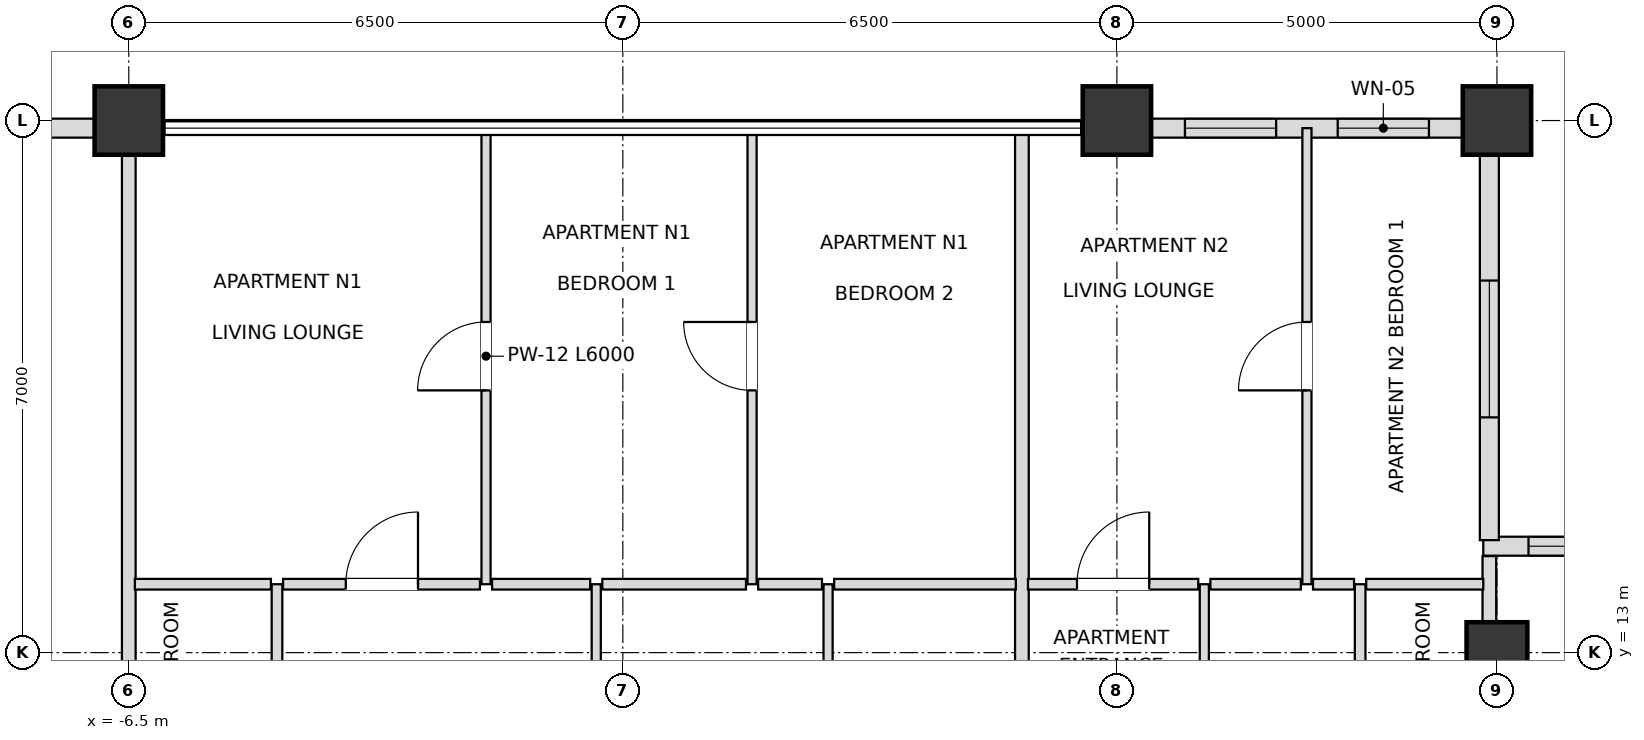
"""IFC4 building model, lengths in metres.
Left out: names, types, materials, properties, quantities, classifications, styles, units other than length and angle.
Written with IfcOpenShell. Run it as: python <this file> out.ifc"""

import sys

from ifc_helpers import new_model, si_unit, direction, frame, frame_2d, origin, origin_2d, place, context, subcontext, project, spatial, rectangle, extrude, element, fill, save


model = new_model("IFC4")
c1 = context("Model", 3, precision=1e-05, world=origin(), true_north=direction((0.0, 1.0)))
c2 = subcontext(c1, "Body", "Model", "MODEL_VIEW")
j1 = project(units=[si_unit("LENGTHUNIT", "METRE"), si_unit("PLANEANGLEUNIT", "RADIAN")], contexts=[c1])
p1 = place(None, origin())
s1 = spatial("IfcSite", under=j1, at=p1, CompositionType="ELEMENT")
p2 = place(p1, origin())
s2 = spatial("IfcBuilding", under=s1, at=p2, CompositionType="ELEMENT")
p3 = place(p2, frame((0.0, 0.0, 243.9)))
s3 = spatial("IfcBuildingStorey", under=s2, at=p3, CompositionType="ELEMENT", Elevation=243.9)
for number, where, z_axis, x_axis in (
    (1, (11.5, 20.0, 0.0), (0.0, 0.0, 1.0), (1.0, 0.0, 0.0)),
    (2, (6.5, 20.0, 0.0), (0.0, 0.0, 1.0), (1.0, 0.0, 0.0)),
    (3, (-6.5, 20.0, 0.0), (0.0, 0.0, 1.0), (1.0, 0.0, 0.0)),
):
    element("IfcColumn", number, at=place(p3, frame(where, z_axis=z_axis, x_axis=x_axis)), inside=s3, PredefinedType="USERDEFINED", context=c2, shape_type="SweptSolid", body=[
        extrude(rectangle(XDim=0.9, YDim=0.9, at=origin_2d()), origin(), (0.0, 0.0, 1.0), 3.6),
    ])
p4 = place(p3, frame((11.5, 13.0, 0.0), z_axis=(0.0, 0.0, 1.0), x_axis=(1.0, 0.0, 0.0)))
e4 = element("IfcColumn", 4, at=p4, inside=s3, PredefinedType="COLUMN", context=c2, shape_type="SweptSolid", body=[
    extrude(rectangle(XDim=0.8, YDim=0.8, at=origin_2d()), origin(), (0.0, 0.0, 1.0), 3.6),
])
p5 = place(p3, frame((11.055, 19.9, 0.0), z_axis=(0.0, 0.0, 1.0), x_axis=(-1.0, 0.0, 0.0)))
e5 = element("IfcWall", 5, at=p5, inside=s3, PredefinedType="SOLIDWALL", context=c2, shape_type="SweptSolid", body=[
    extrude(rectangle(XDim=4.11, YDim=0.25, at=frame_2d((2.055, 0.0))), origin(), (0.0, 0.0, 1.0), 2.748),
])
p6 = place(p5, frame((0.45, 0.0, 0.72)))
e6 = element("IfcOpeningElement", 6, at=p6, cuts=e5, PredefinedType="OPENING", context=c2, shape_type="SweptSolid", body=[
    extrude(rectangle(XDim=1.2, YDim=1.68, at=frame_2d((0.6, 0.84))), frame((0.0, 0.135, 0.0), z_axis=(0.0, -1.0, 0.0), x_axis=(1.0, 0.0, 0.0)), (0.0, 0.0, 1.0), 0.27),
])
p7 = place(p5, frame((2.46, 0.0, 0.72)))
e7 = element("IfcOpeningElement", 7, at=p7, cuts=e5, PredefinedType="OPENING", context=c2, shape_type="SweptSolid", body=[
    extrude(rectangle(XDim=1.2, YDim=1.68, at=frame_2d((0.6, 0.84))), frame((0.0, 0.135, 0.0), z_axis=(0.0, -1.0, 0.0), x_axis=(1.0, 0.0, 0.0)), (0.0, 0.0, 1.0), 0.27),
])
p8 = place(p3, frame((-6.945, 19.9, 0.0), z_axis=(0.0, 0.0, 1.0), x_axis=(-1.0, 0.0, 0.0)))
e8 = element("IfcWall", 8, at=p8, inside=s3, PredefinedType="SOLIDWALL", context=c2, shape_type="SweptSolid", body=[
    extrude(rectangle(XDim=4.11, YDim=0.25, at=frame_2d((2.055, 0.0))), origin(), (0.0, 0.0, 1.0), 2.748),
])
p9 = place(p8, frame((1.155, 0.0, 0.72)))
e9 = element("IfcOpeningElement", 9, at=p9, cuts=e8, PredefinedType="OPENING", context=c2, shape_type="SweptSolid", body=[
    extrude(rectangle(XDim=1.8, YDim=1.68, at=frame_2d((0.9, 0.84))), frame((0.0, 0.135, 0.0), z_axis=(0.0, -1.0, 0.0), x_axis=(1.0, 0.0, 0.0)), (0.0, 0.0, 1.0), 0.27),
])
p10 = place(p3, frame((16.98, 14.4, 0.0), z_axis=(0.0, 0.0, 1.0), x_axis=(-1.0, 0.0, 0.0)))
e10 = element("IfcWall", 10, at=p10, inside=s3, PredefinedType="SOLIDWALL", context=c2, shape_type="SweptSolid", body=[
    extrude(rectangle(XDim=5.66, YDim=0.25, at=frame_2d((2.83, 0.0))), origin(), (0.0, 0.0, 1.0), 2.748),
])
p11 = place(p10, frame((0.595, 0.0, 0.72)))
e11 = element("IfcOpeningElement", 11, at=p11, cuts=e10, PredefinedType="OPENING", context=c2, shape_type="SweptSolid", body=[
    extrude(rectangle(XDim=1.8, YDim=1.68, at=frame_2d((0.9, 0.84))), frame((0.0, 0.135, 0.0), z_axis=(0.0, -1.0, 0.0), x_axis=(1.0, 0.0, 0.0)), (0.0, 0.0, 1.0), 0.27),
])
p12 = place(p10, frame((3.265, 0.0, 0.72)))
e12 = element("IfcOpeningElement", 12, at=p12, cuts=e10, PredefinedType="OPENING", context=c2, shape_type="SweptSolid", body=[
    extrude(rectangle(XDim=1.8, YDim=1.68, at=frame_2d((0.9, 0.84))), frame((0.0, 0.135, 0.0), z_axis=(0.0, -1.0, 0.0), x_axis=(1.0, 0.0, 0.0)), (0.0, 0.0, 1.0), 0.27),
])
p13 = place(p3, frame((11.4, 14.48, 0.0), z_axis=(0.0, 0.0, 1.0), x_axis=(0.0, 1.0, 0.0)))
e13 = element("IfcWall", 13, at=p13, inside=s3, PredefinedType="SOLIDWALL", context=c2, shape_type="SweptSolid", body=[
    extrude(rectangle(XDim=5.34, YDim=0.25, at=frame_2d((2.67, 0.0))), origin(), (0.0, 0.0, 1.0), 2.748),
])
p14 = place(p13, frame((1.615, 0.0, 0.72)))
e14 = element("IfcOpeningElement", 14, at=p14, cuts=e13, PredefinedType="OPENING", context=c2, shape_type="SweptSolid", body=[
    extrude(rectangle(XDim=1.8, YDim=1.68, at=frame_2d((0.9, 0.84))), frame((0.0, 0.135, 0.0), z_axis=(0.0, -1.0, 0.0), x_axis=(1.0, 0.0, 0.0)), (0.0, 0.0, 1.0), 0.27),
])
p15 = place(p3, frame((-6.5, 9.2, 0.0), z_axis=(0.0, 0.0, 1.0), x_axis=(0.0, 1.0, 0.0)))
e15 = element("IfcWall", 15, at=p15, inside=s3, PredefinedType="PARTITIONING", context=c2, shape_type="SweptSolid", body=[
    extrude(rectangle(XDim=10.7, YDim=0.18, at=frame_2d((5.35, 0.0))), origin(), (0.0, 0.0, 1.0), 2.826),
])
p16 = place(p3, frame((-4.55, 9.2, 0.0), z_axis=(0.0, 0.0, 1.0), x_axis=(0.0, 1.0, 0.0)))
e16 = element("IfcWall", 16, at=p16, inside=s3, PredefinedType="PARTITIONING", context=c2, shape_type="SweptSolid", body=[
    extrude(rectangle(XDim=4.7, YDim=0.14, at=frame_2d((2.35, 0.0))), origin(), (0.0, 0.0, 1.0), 3.38),
])
p17 = place(p16, frame((1.9, 0.0, 0.0)))
e17 = element("IfcOpeningElement", 17, at=p17, cuts=e16, PredefinedType="OPENING", context=c2, shape_type="SweptSolid", body=[
    extrude(rectangle(XDim=0.9, YDim=2.1, at=frame_2d((0.45, 1.05))), frame((0.0, 0.08, 0.0), z_axis=(0.0, -1.0, 0.0), x_axis=(1.0, 0.0, 0.0)), (0.0, 0.0, 1.0), 0.16),
])
p18 = place(p3, frame((-1.8, 13.9, 0.0), z_axis=(0.0, 0.0, 1.0), x_axis=(0.0, 1.0, 0.0)))
e18 = element("IfcWall", 18, at=p18, inside=s3, PredefinedType="PARTITIONING", context=c2, shape_type="SweptSolid", body=[
    extrude(rectangle(XDim=6.0, YDim=0.12, at=frame_2d((3.0, 0.0))), origin(), (0.0, 0.0, 1.0), 3.018),
])
p19 = place(p18, frame((2.55, 0.0, 0.0)))
e19 = element("IfcOpeningElement", 19, at=p19, cuts=e18, PredefinedType="OPENING", context=c2, shape_type="SweptSolid", body=[
    extrude(rectangle(XDim=0.9, YDim=2.1, at=frame_2d((0.45, 1.05))), frame((0.0, 0.07, 0.0), z_axis=(0.0, -1.0, 0.0), x_axis=(1.0, 0.0, 0.0)), (0.0, 0.0, 1.0), 0.14),
])
p20 = place(p3, frame((-0.35, 9.2, 0.0), z_axis=(0.0, 0.0, 1.0), x_axis=(0.0, 1.0, 0.0)))
e20 = element("IfcWall", 20, at=p20, inside=s3, PredefinedType="PARTITIONING", context=c2, shape_type="SweptSolid", body=[
    extrude(rectangle(XDim=4.7, YDim=0.12, at=frame_2d((2.35, 0.0))), origin(), (0.0, 0.0, 1.0), 3.38),
])
p21 = place(p20, frame((1.875, 0.0, 0.0)))
e21 = element("IfcOpeningElement", 21, at=p21, cuts=e20, PredefinedType="OPENING", context=c2, shape_type="SweptSolid", body=[
    extrude(rectangle(XDim=0.95, YDim=2.1, at=frame_2d((0.475, 1.05))), frame((0.0, 0.07, 0.0), z_axis=(0.0, -1.0, 0.0), x_axis=(1.0, 0.0, 0.0)), (0.0, 0.0, 1.0), 0.14),
])
p22 = place(p3, frame((1.7, 13.9, 0.0), z_axis=(0.0, 0.0, 1.0), x_axis=(0.0, 1.0, 0.0)))
e22 = element("IfcWall", 22, at=p22, inside=s3, PredefinedType="PARTITIONING", context=c2, shape_type="SweptSolid", body=[
    extrude(rectangle(XDim=6.0, YDim=0.12, at=frame_2d((3.0, 0.0))), origin(), (0.0, 0.0, 1.0), 3.018),
])
p23 = place(p22, frame((2.55, 0.0, 0.0)))
e23 = element("IfcOpeningElement", 23, at=p23, cuts=e22, PredefinedType="OPENING", context=c2, shape_type="SweptSolid", body=[
    extrude(rectangle(XDim=0.9, YDim=2.1, at=frame_2d((0.45, 1.05))), frame((0.0, 0.07, 0.0), z_axis=(0.0, -1.0, 0.0), x_axis=(1.0, 0.0, 0.0)), (0.0, 0.0, 1.0), 0.14),
])
p24 = place(p3, frame((2.7, 9.2, 0.0), z_axis=(0.0, 0.0, 1.0), x_axis=(0.0, 1.0, 0.0)))
e24 = element("IfcWall", 24, at=p24, inside=s3, PredefinedType="PARTITIONING", context=c2, shape_type="SweptSolid", body=[
    extrude(rectangle(XDim=4.7, YDim=0.12, at=frame_2d((2.35, 0.0))), origin(), (0.0, 0.0, 1.0), 3.38),
])
p25 = place(p24, frame((1.9, 0.0, 0.0)))
e25 = element("IfcOpeningElement", 25, at=p25, cuts=e24, PredefinedType="OPENING", context=c2, shape_type="SweptSolid", body=[
    extrude(rectangle(XDim=0.9, YDim=2.1, at=frame_2d((0.45, 1.05))), frame((0.0, 0.07, 0.0), z_axis=(0.0, -1.0, 0.0), x_axis=(1.0, 0.0, 0.0)), (0.0, 0.0, 1.0), 0.14),
])
p26 = place(p3, frame((5.25, 9.2, 0.0), z_axis=(0.0, 0.0, 1.0), x_axis=(0.0, 1.0, 0.0)))
e26 = element("IfcWall", 26, at=p26, inside=s3, PredefinedType="PARTITIONING", context=c2, shape_type="SweptSolid", body=[
    extrude(rectangle(XDim=10.7, YDim=0.18, at=frame_2d((5.35, 0.0))), origin(), (0.0, 0.0, 1.0), 3.018),
])
p27 = place(p3, frame((7.65, 9.2, 0.0), z_axis=(0.0, 0.0, 1.0), x_axis=(0.0, 1.0, 0.0)))
e27 = element("IfcWall", 27, at=p27, inside=s3, PredefinedType="PARTITIONING", context=c2, shape_type="SweptSolid", body=[
    extrude(rectangle(XDim=4.7, YDim=0.12, at=frame_2d((2.35, 0.0))), origin(), (0.0, 0.0, 1.0), 2.826),
])
p28 = place(p27, frame((1.875, 0.0, 0.0)))
e28 = element("IfcOpeningElement", 28, at=p28, cuts=e27, PredefinedType="OPENING", context=c2, shape_type="SweptSolid", body=[
    extrude(rectangle(XDim=0.95, YDim=2.1, at=frame_2d((0.475, 1.05))), frame((0.0, 0.07, 0.0), z_axis=(0.0, -1.0, 0.0), x_axis=(1.0, 0.0, 0.0)), (0.0, 0.0, 1.0), 0.14),
])
p29 = place(p3, frame((9.0, 13.9, 0.0), z_axis=(0.0, 0.0, 1.0), x_axis=(0.0, 1.0, 0.0)))
e29 = element("IfcWall", 29, at=p29, inside=s3, PredefinedType="PARTITIONING", context=c2, shape_type="SweptSolid", body=[
    extrude(rectangle(XDim=6.0, YDim=0.12, at=frame_2d((3.0, 0.0))), origin(), (0.0, 0.0, 1.0), 3.38),
])
p30 = place(p29, frame((2.55, 0.0, 0.0)))
e30 = element("IfcOpeningElement", 30, at=p30, cuts=e29, PredefinedType="OPENING", context=c2, shape_type="SweptSolid", body=[
    extrude(rectangle(XDim=0.9, YDim=2.1, at=frame_2d((0.45, 1.05))), frame((0.0, 0.07, 0.0), z_axis=(0.0, -1.0, 0.0), x_axis=(1.0, 0.0, 0.0)), (0.0, 0.0, 1.0), 0.14),
])
p31 = place(p3, frame((9.7, 9.2, 0.0), z_axis=(0.0, 0.0, 1.0), x_axis=(0.0, 1.0, 0.0)))
e31 = element("IfcWall", 31, at=p31, inside=s3, PredefinedType="PARTITIONING", context=c2, shape_type="SweptSolid", body=[
    extrude(rectangle(XDim=4.7, YDim=0.14, at=frame_2d((2.35, 0.0))), origin(), (0.0, 0.0, 1.0), 2.826),
])
p32 = place(p31, frame((1.9, 0.0, 0.0)))
e32 = element("IfcOpeningElement", 32, at=p32, cuts=e31, PredefinedType="OPENING", context=c2, shape_type="SweptSolid", body=[
    extrude(rectangle(XDim=0.9, YDim=2.1, at=frame_2d((0.45, 1.05))), frame((0.0, 0.08, 0.0), z_axis=(0.0, -1.0, 0.0), x_axis=(1.0, 0.0, 0.0)), (0.0, 0.0, 1.0), 0.16),
])
p33 = place(p3, frame((11.4, 9.2, 0.0), z_axis=(0.0, 0.0, 1.0), x_axis=(0.0, 1.0, 0.0)))
e33 = element("IfcWall", 33, at=p33, inside=s3, PredefinedType="PARTITIONING", context=c2, shape_type="SweptSolid", body=[
    extrude(rectangle(XDim=5.07, YDim=0.18, at=frame_2d((2.535, 0.0))), origin(), (0.0, 0.0, 1.0), 2.748),
])
p34 = place(p3, frame((-6.42, 13.9, 0.0), z_axis=(0.0, 0.0, 1.0), x_axis=(1.0, 0.0, 0.0)))
e34 = element("IfcWall", 34, at=p34, inside=s3, PredefinedType="PARTITIONING", context=c2, shape_type="SweptSolid", body=[
    extrude(rectangle(XDim=1.79, YDim=0.14, at=frame_2d((0.895, 0.0))), origin(), (0.0, 0.0, 1.0), 3.38),
])
p35 = place(p3, frame((-4.47, 13.9, 0.0), z_axis=(0.0, 0.0, 1.0), x_axis=(1.0, 0.0, 0.0)))
e35 = element("IfcWall", 35, at=p35, inside=s3, PredefinedType="PARTITIONING", context=c2, shape_type="SweptSolid", body=[
    extrude(rectangle(XDim=2.59, YDim=0.14, at=frame_2d((1.295, 0.0))), origin(), (0.0, 0.0, 1.0), 3.38),
])
p36 = place(p35, frame((0.825, 0.0, 0.0)))
e36 = element("IfcOpeningElement", 36, at=p36, cuts=e35, PredefinedType="OPENING", context=c2, shape_type="SweptSolid", body=[
    extrude(rectangle(XDim=0.95, YDim=2.1, at=frame_2d((0.475, 1.05))), frame((0.0, 0.08, 0.0), z_axis=(0.0, -1.0, 0.0), x_axis=(1.0, 0.0, 0.0)), (0.0, 0.0, 1.0), 0.16),
])
p37 = place(p3, frame((-1.72, 13.9, 0.0), z_axis=(0.0, 0.0, 1.0), x_axis=(1.0, 0.0, 0.0)))
e37 = element("IfcWall", 37, at=p37, inside=s3, PredefinedType="PARTITIONING", context=c2, shape_type="SweptSolid", body=[
    extrude(rectangle(XDim=1.29, YDim=0.14, at=frame_2d((0.645, 0.0))), origin(), (0.0, 0.0, 1.0), 3.38),
])
p38 = place(p3, frame((-0.27, 13.9, 0.0), z_axis=(0.0, 0.0, 1.0), x_axis=(1.0, 0.0, 0.0)))
e38 = element("IfcWall", 38, at=p38, inside=s3, PredefinedType="PARTITIONING", context=c2, shape_type="SweptSolid", body=[
    extrude(rectangle(XDim=1.89, YDim=0.14, at=frame_2d((0.945, 0.0))), origin(), (0.0, 0.0, 1.0), 3.38),
])
p39 = place(p3, frame((1.78, 13.9, 0.0), z_axis=(0.0, 0.0, 1.0), x_axis=(1.0, 0.0, 0.0)))
e39 = element("IfcWall", 39, at=p39, inside=s3, PredefinedType="PARTITIONING", context=c2, shape_type="SweptSolid", body=[
    extrude(rectangle(XDim=0.84, YDim=0.14, at=frame_2d((0.42, 0.0))), origin(), (0.0, 0.0, 1.0), 3.38),
])
p40 = place(p3, frame((2.78, 13.9, 0.0), z_axis=(0.0, 0.0, 1.0), x_axis=(1.0, 0.0, 0.0)))
e40 = element("IfcWall", 40, at=p40, inside=s3, PredefinedType="PARTITIONING", context=c2, shape_type="SweptSolid", body=[
    extrude(rectangle(XDim=2.39, YDim=0.14, at=frame_2d((1.195, 0.0))), origin(), (0.0, 0.0, 1.0), 3.38),
])
p41 = place(p3, frame((5.33, 13.9, 0.0), z_axis=(0.0, 0.0, 1.0), x_axis=(1.0, 0.0, 0.0)))
e41 = element("IfcWall", 41, at=p41, inside=s3, PredefinedType="PARTITIONING", context=c2, shape_type="SweptSolid", body=[
    extrude(rectangle(XDim=2.24, YDim=0.14, at=frame_2d((1.12, 0.0))), origin(), (0.0, 0.0, 1.0), 2.826),
])
p42 = place(p41, frame((0.645, 0.0, 0.0)))
e42 = element("IfcOpeningElement", 42, at=p42, cuts=e41, PredefinedType="OPENING", context=c2, shape_type="SweptSolid", body=[
    extrude(rectangle(XDim=0.95, YDim=2.1, at=frame_2d((0.475, 1.05))), frame((0.0, 0.08, 0.0), z_axis=(0.0, -1.0, 0.0), x_axis=(1.0, 0.0, 0.0)), (0.0, 0.0, 1.0), 0.16),
])
p43 = place(p3, frame((7.73, 13.9, 0.0), z_axis=(0.0, 0.0, 1.0), x_axis=(1.0, 0.0, 0.0)))
e43 = element("IfcWall", 43, at=p43, inside=s3, PredefinedType="PARTITIONING", context=c2, shape_type="SweptSolid", body=[
    extrude(rectangle(XDim=1.19, YDim=0.14, at=frame_2d((0.595, 0.0))), origin(), (0.0, 0.0, 1.0), 3.38),
])
p44 = place(p3, frame((9.08, 13.9, 0.0), z_axis=(0.0, 0.0, 1.0), x_axis=(1.0, 0.0, 0.0)))
e44 = element("IfcWall", 44, at=p44, inside=s3, PredefinedType="PARTITIONING", context=c2, shape_type="SweptSolid", body=[
    extrude(rectangle(XDim=0.54, YDim=0.14, at=frame_2d((0.27, 0.0))), origin(), (0.0, 0.0, 1.0), 3.38),
])
p45 = place(p3, frame((9.78, 13.9, 0.0), z_axis=(0.0, 0.0, 1.0), x_axis=(1.0, 0.0, 0.0)))
e45 = element("IfcWall", 45, at=p45, inside=s3, PredefinedType="PARTITIONING", context=c2, shape_type="SweptSolid", body=[
    extrude(rectangle(XDim=1.54, YDim=0.14, at=frame_2d((0.77, 0.0))), origin(), (0.0, 0.0, 1.0), 3.38),
])
p46 = place(p6, origin())
e46 = element("IfcWindow", 46, at=p46, inside=s3, PartitioningType="SINGLE_PANEL", PredefinedType="WINDOW", context=c2, shape_type="SweptSolid", body=[
    extrude(rectangle(XDim=1.2, YDim=1.68, at=frame_2d((0.6, 0.84))), frame((0.0, 0.03, 0.0), z_axis=(0.0, -1.0, 0.0), x_axis=(1.0, 0.0, 0.0)), (0.0, 0.0, 1.0), 0.06),
])
fill(e6, e46)
p47 = place(p7, origin())
e47 = element("IfcWindow", 47, at=p47, inside=s3, PartitioningType="SINGLE_PANEL", PredefinedType="WINDOW", context=c2, shape_type="SweptSolid", body=[
    extrude(rectangle(XDim=1.2, YDim=1.68, at=frame_2d((0.6, 0.84))), frame((0.0, 0.03, 0.0), z_axis=(0.0, -1.0, 0.0), x_axis=(1.0, 0.0, 0.0)), (0.0, 0.0, 1.0), 0.06),
])
fill(e7, e47)
p48 = place(p12, origin())
e48 = element("IfcWindow", 48, at=p48, inside=s3, PartitioningType="SINGLE_PANEL", PredefinedType="WINDOW", context=c2, shape_type="SweptSolid", body=[
    extrude(rectangle(XDim=1.8, YDim=1.68, at=frame_2d((0.9, 0.84))), frame((0.0, 0.03, 0.0), z_axis=(0.0, -1.0, 0.0), x_axis=(1.0, 0.0, 0.0)), (0.0, 0.0, 1.0), 0.06),
])
fill(e12, e48)
p49 = place(p14, origin())
e49 = element("IfcWindow", 49, at=p49, inside=s3, PartitioningType="SINGLE_PANEL", PredefinedType="WINDOW", context=c2, shape_type="SweptSolid", body=[
    extrude(rectangle(XDim=1.8, YDim=1.68, at=frame_2d((0.9, 0.84))), frame((0.0, 0.03, 0.0), z_axis=(0.0, -1.0, 0.0), x_axis=(1.0, 0.0, 0.0)), (0.0, 0.0, 1.0), 0.06),
])
fill(e14, e49)
p50 = place(p36, origin())
e50 = element("IfcDoor", 50, at=p50, inside=s3, OperationType="SINGLE_SWING_RIGHT", PredefinedType="DOOR", context=c2, shape_type="SweptSolid", body=[
    extrude(rectangle(XDim=0.95, YDim=2.1, at=frame_2d((0.475, 1.05))), frame((0.0, 0.025, 0.0), z_axis=(0.0, -1.0, 0.0), x_axis=(1.0, 0.0, 0.0)), (0.0, 0.0, 1.0), 0.05),
])
fill(e36, e50)
p51 = place(p19, origin())
e51 = element("IfcDoor", 51, at=p51, inside=s3, OperationType="SINGLE_SWING_LEFT", PredefinedType="DOOR", context=c2, shape_type="SweptSolid", body=[
    extrude(rectangle(XDim=0.9, YDim=2.1, at=frame_2d((0.45, 1.05))), frame((0.0, 0.025, 0.0), z_axis=(0.0, -1.0, 0.0), x_axis=(1.0, 0.0, 0.0)), (0.0, 0.0, 1.0), 0.05),
])
fill(e19, e51)
p52 = place(p23, origin())
e52 = element("IfcDoor", 52, at=p52, inside=s3, OperationType="SINGLE_SWING_RIGHT", PredefinedType="DOOR", context=c2, shape_type="SweptSolid", body=[
    extrude(rectangle(XDim=0.9, YDim=2.1, at=frame_2d((0.45, 1.05))), frame((0.0, 0.025, 0.0), z_axis=(0.0, -1.0, 0.0), x_axis=(1.0, 0.0, 0.0)), (0.0, 0.0, 1.0), 0.05),
])
fill(e23, e52)
p53 = place(p42, origin())
e53 = element("IfcDoor", 53, at=p53, inside=s3, OperationType="SINGLE_SWING_RIGHT", PredefinedType="DOOR", context=c2, shape_type="SweptSolid", body=[
    extrude(rectangle(XDim=0.95, YDim=2.1, at=frame_2d((0.475, 1.05))), frame((0.0, 0.025, 0.0), z_axis=(0.0, -1.0, 0.0), x_axis=(1.0, 0.0, 0.0)), (0.0, 0.0, 1.0), 0.05),
])
fill(e42, e53)
p54 = place(p30, origin())
e54 = element("IfcDoor", 54, at=p54, inside=s3, OperationType="SINGLE_SWING_LEFT", PredefinedType="DOOR", context=c2, shape_type="SweptSolid", body=[
    extrude(rectangle(XDim=0.9, YDim=2.1, at=frame_2d((0.45, 1.05))), frame((0.0, 0.025, 0.0), z_axis=(0.0, -1.0, 0.0), x_axis=(1.0, 0.0, 0.0)), (0.0, 0.0, 1.0), 0.05),
])
fill(e30, e54)
save(model, sys.argv[1])
